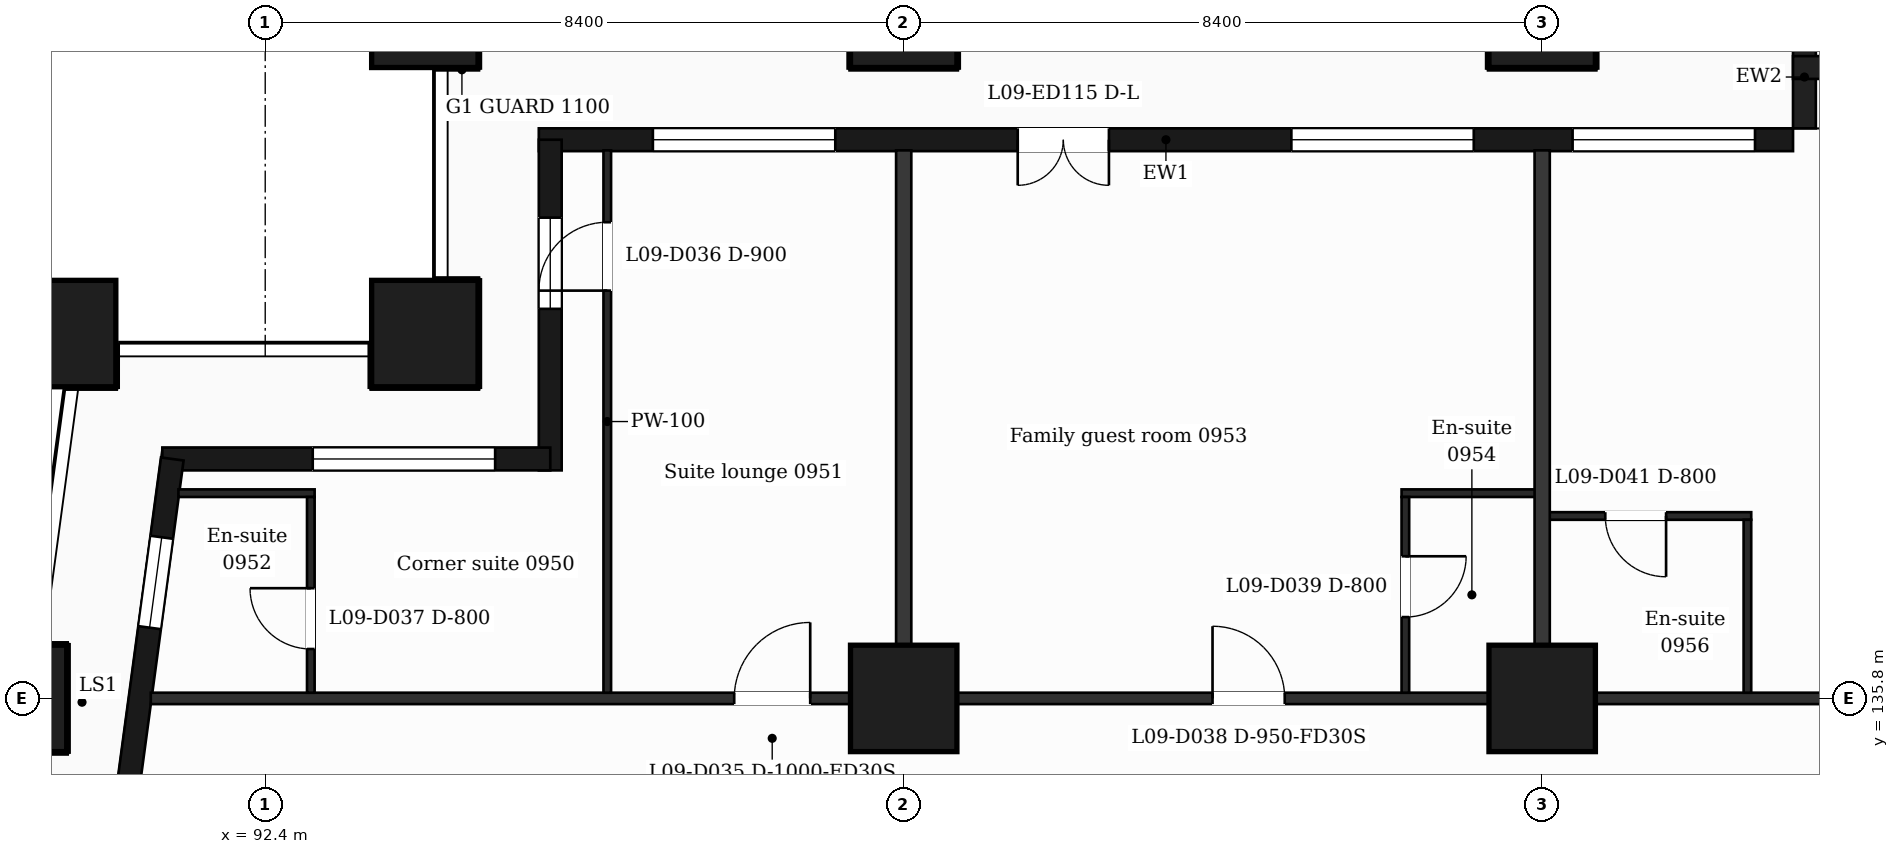
"""IFC4 building model, lengths in metres.
Left out: names, types, materials, properties, quantities, classifications, styles, units other than length and angle.
Written with IfcOpenShell. Run it as: python <this file> out.ifc"""

import sys

from ifc_helpers import new_model, si_unit, direction, frame, frame_2d, origin, origin_2d, place, context, subcontext, project, spatial, rectangle, extrude, element, fill, save


model = new_model("IFC4")
c1 = context("Model", 3, precision=1e-05, world=origin(), true_north=direction((0.0, 1.0)))
c2 = subcontext(c1, "Body", "Model", "MODEL_VIEW")
j1 = project(units=[si_unit("LENGTHUNIT", "METRE"), si_unit("PLANEANGLEUNIT", "RADIAN")], contexts=[c1])
p1 = place(None, origin())
s1 = spatial("IfcSite", under=j1, at=p1, CompositionType="ELEMENT")
p2 = place(p1, origin())
s2 = spatial("IfcBuilding", under=s1, at=p2, CompositionType="ELEMENT")
p3 = place(p2, frame((0.0, 0.0, 49.5)))
s3 = spatial("IfcBuildingStorey", under=s2, at=p3, CompositionType="ELEMENT", Elevation=49.5)
for number, where, z_axis, x_axis in (
    (1, (94.5, 140.6, 0.0), (0.0, 0.0, 1.0), (1.0, 0.0, 0.0)),
    (2, (89.735, 140.6, 0.0), (0.0, 0.0, 1.0), (1.0, 0.0, 0.0)),
    (3, (100.8, 135.8, 0.0), (0.0, 0.0, 1.0), (1.0, 0.0, 0.0)),
    (4, (109.2, 135.8, 0.0), (0.0, 0.0, 1.0), (1.0, 0.0, 0.0)),
    (5, (89.088, 135.8, 0.0), (0.0, 0.0, 1.0), (1.0, 0.0, 0.0)),
    (6, (100.8, 144.8, 0.0), (0.0, 0.0, 1.0), (1.0, 0.0, 0.0)),
    (7, (109.2, 144.8, 0.0), (0.0, 0.0, 1.0), (1.0, 0.0, 0.0)),
    (8, (94.5, 144.8, 0.0), (0.0, 0.0, 1.0), (1.0, 0.0, 0.0)),
):
    element("IfcColumn", number, at=place(p3, frame(where, z_axis=z_axis, x_axis=x_axis)), inside=s3, PredefinedType="COLUMN", context=c2, shape_type="SweptSolid", body=[
        extrude(rectangle(XDim=1.4, YDim=1.4, at=origin_2d()), origin(), (0.0, 0.0, 1.0), 3.5),
    ])
p4 = place(p3, frame((112.5, 143.15, 0.0), z_axis=(0.0, 0.0, 1.0), x_axis=(-1.0, 0.0, 0.0)))
e9 = element("IfcWall", 9, at=p4, inside=s3, PredefinedType="SOLIDWALL", context=c2, shape_type="SweptSolid", body=[
    extrude(rectangle(XDim=16.5, YDim=0.3, at=frame_2d((8.25, 0.0))), origin(), (0.0, 0.0, 1.0), 3.18),
])
p5 = place(p4, frame((0.5, 0.0, 0.9)))
e10 = element("IfcOpeningElement", 10, at=p5, cuts=e9, PredefinedType="OPENING", context=c2, shape_type="SweptSolid", body=[
    extrude(rectangle(XDim=2.4, YDim=2.1, at=frame_2d((1.2, 1.05))), frame((0.0, 0.16, 0.0), z_axis=(0.0, -1.0, 0.0), x_axis=(1.0, 0.0, 0.0)), (0.0, 0.0, 1.0), 0.32),
])
p6 = place(p4, frame((4.2, 0.0, 0.9)))
e11 = element("IfcOpeningElement", 11, at=p6, cuts=e9, PredefinedType="OPENING", context=c2, shape_type="SweptSolid", body=[
    extrude(rectangle(XDim=2.4, YDim=2.1, at=frame_2d((1.2, 1.05))), frame((0.0, 0.16, 0.0), z_axis=(0.0, -1.0, 0.0), x_axis=(1.0, 0.0, 0.0)), (0.0, 0.0, 1.0), 0.32),
])
p7 = place(p4, frame((9.0, 0.0, 0.0)))
e12 = element("IfcOpeningElement", 12, at=p7, cuts=e9, PredefinedType="OPENING", context=c2, shape_type="SweptSolid", body=[
    extrude(rectangle(XDim=1.2, YDim=2.4, at=frame_2d((0.6, 1.2))), frame((0.0, 0.16, 0.0), z_axis=(0.0, -1.0, 0.0), x_axis=(1.0, 0.0, 0.0)), (0.0, 0.0, 1.0), 0.32),
])
p8 = place(p4, frame((12.6, 0.0, 0.9)))
e13 = element("IfcOpeningElement", 13, at=p8, cuts=e9, PredefinedType="OPENING", context=c2, shape_type="SweptSolid", body=[
    extrude(rectangle(XDim=2.4, YDim=2.1, at=frame_2d((1.2, 1.05))), frame((0.0, 0.16, 0.0), z_axis=(0.0, -1.0, 0.0), x_axis=(1.0, 0.0, 0.0)), (0.0, 0.0, 1.0), 0.32),
])
p9 = place(p3, frame((112.65, 143.3, 0.0), z_axis=(0.0, 0.0, 1.0), x_axis=(0.0, 1.0, 0.0)))
e14 = element("IfcWall", 14, at=p9, inside=s3, PredefinedType="SOLIDWALL", context=c2, shape_type="SweptSolid", body=[
    extrude(rectangle(XDim=1.35, YDim=0.3, at=frame_2d((0.675, 0.0))), origin(), (0.0, 0.0, 1.0), 3.18),
])
p10 = place(p3, frame((116.4, 144.1, 0.0), z_axis=(0.0, 0.0, 1.0), x_axis=(-1.0, 0.0, 0.0)))
e15 = element("IfcWall", 15, at=p10, inside=s3, PredefinedType="SOLIDWALL", context=c2, shape_type="SweptSolid", body=[
    extrude(rectangle(XDim=3.9, YDim=0.3, at=frame_2d((1.95, 0.0))), origin(), (0.0, 0.0, 1.0), 3.18),
])
p11 = place(p10, frame((1.35, 0.0, 0.0)))
e16 = element("IfcOpeningElement", 16, at=p11, cuts=e15, PredefinedType="OPENING", context=c2, shape_type="SweptSolid", body=[
    extrude(rectangle(XDim=1.2, YDim=2.4, at=frame_2d((0.6, 1.2))), frame((0.0, 0.16, 0.0), z_axis=(0.0, -1.0, 0.0), x_axis=(1.0, 0.0, 0.0)), (0.0, 0.0, 1.0), 0.32),
])
p12 = place(p3, frame((96.15, 143.15, 0.0), z_axis=(0.0, 0.0, 1.0), x_axis=(0.0, -1.0, 0.0)))
e17 = element("IfcWall", 17, at=p12, inside=s3, PredefinedType="SOLIDWALL", context=c2, shape_type="SweptSolid", body=[
    extrude(rectangle(XDim=4.35, YDim=0.3, at=frame_2d((2.175, 0.0))), origin(), (0.0, 0.0, 1.0), 3.18),
])
p13 = place(p12, frame((1.025, 0.0, 0.9)))
e18 = element("IfcOpeningElement", 18, at=p13, cuts=e17, PredefinedType="OPENING", context=c2, shape_type="SweptSolid", body=[
    extrude(rectangle(XDim=1.2, YDim=2.1, at=frame_2d((0.6, 1.05))), frame((0.0, 0.16, 0.0), z_axis=(0.0, -1.0, 0.0), x_axis=(1.0, 0.0, 0.0)), (0.0, 0.0, 1.0), 0.32),
])
p14 = place(p3, frame((96.15, 138.95, 0.0), z_axis=(0.0, 0.0, 1.0), x_axis=(-1.0, 0.0, 0.0)))
e19 = element("IfcWall", 19, at=p14, inside=s3, PredefinedType="SOLIDWALL", context=c2, shape_type="SweptSolid", body=[
    extrude(rectangle(XDim=5.104, YDim=0.3, at=frame_2d((2.552, 0.0))), origin(), (0.0, 0.0, 1.0), 3.18),
])
p15 = place(p14, frame((0.725, 0.0, 0.9)))
e20 = element("IfcOpeningElement", 20, at=p15, cuts=e19, PredefinedType="OPENING", context=c2, shape_type="SweptSolid", body=[
    extrude(rectangle(XDim=2.4, YDim=2.1, at=frame_2d((1.2, 1.05))), frame((0.0, 0.16, 0.0), z_axis=(0.0, -1.0, 0.0), x_axis=(1.0, 0.0, 0.0)), (0.0, 0.0, 1.0), 0.32),
])
p16 = place(p3, frame((91.177, 138.95, 0.0), z_axis=(0.0, 0.0, 1.0), x_axis=(-0.133426664613, -0.991058689065, 0.0)))
e21 = element("IfcWall", 21, at=p16, inside=s3, PredefinedType="SOLIDWALL", context=c2, shape_type="SweptSolid", body=[
    extrude(rectangle(XDim=6.609, YDim=0.3, at=frame_2d((3.305, 0.0))), origin(), (0.0, 0.0, 1.0), 3.18),
])
p17 = place(p16, frame((1.039, 0.0, 0.9)))
e22 = element("IfcOpeningElement", 22, at=p17, cuts=e21, PredefinedType="OPENING", context=c2, shape_type="SweptSolid", body=[
    extrude(rectangle(XDim=1.2, YDim=2.1, at=frame_2d((0.6, 1.05))), frame((0.0, 0.16, 0.0), z_axis=(0.0, -1.0, 0.0), x_axis=(1.0, 0.0, 0.0)), (0.0, 0.0, 1.0), 0.32),
])
p18 = place(p16, frame((4.294, 0.0, 0.0)))
e23 = element("IfcOpeningElement", 23, at=p18, cuts=e21, PredefinedType="OPENING", context=c2, shape_type="SweptSolid", body=[
    extrude(rectangle(XDim=1.2, YDim=2.4, at=frame_2d((0.6, 1.2))), frame((0.0, 0.16, 0.0), z_axis=(0.0, -1.0, 0.0), x_axis=(1.0, 0.0, 0.0)), (0.0, 0.0, 1.0), 0.32),
])
p19 = place(p3, frame((90.895, 135.8, 0.0), z_axis=(0.0, 0.0, 1.0), x_axis=(1.0, 0.0, 0.0)))
e24 = element("IfcWall", 24, at=p19, inside=s3, PredefinedType="PARTITIONING", context=c2, shape_type="SweptSolid", body=[
    extrude(rectangle(XDim=45.011, YDim=0.15, at=frame_2d((22.505, 0.0))), origin(), (0.0, 0.0, 1.0), 3.18),
])
p20 = place(p19, frame((7.675, 0.0, 0.0)))
e25 = element("IfcOpeningElement", 25, at=p20, cuts=e24, PredefinedType="OPENING", context=c2, shape_type="SweptSolid", body=[
    extrude(rectangle(XDim=1.0, YDim=2.1, at=frame_2d((0.5, 1.05))), frame((0.0, 0.085, 0.0), z_axis=(0.0, -1.0, 0.0), x_axis=(1.0, 0.0, 0.0)), (0.0, 0.0, 1.0), 0.17),
])
p21 = place(p19, frame((13.969, 0.0, 0.0)))
e26 = element("IfcOpeningElement", 26, at=p21, cuts=e24, PredefinedType="OPENING", context=c2, shape_type="SweptSolid", body=[
    extrude(rectangle(XDim=0.95, YDim=2.1, at=frame_2d((0.475, 1.05))), frame((0.0, 0.085, 0.0), z_axis=(0.0, -1.0, 0.0), x_axis=(1.0, 0.0, 0.0)), (0.0, 0.0, 1.0), 0.17),
])
p22 = place(p19, frame((24.393, 0.0, 0.0)))
e27 = element("IfcOpeningElement", 27, at=p22, cuts=e24, PredefinedType="OPENING", context=c2, shape_type="SweptSolid", body=[
    extrude(rectangle(XDim=0.95, YDim=2.1, at=frame_2d((0.475, 1.05))), frame((0.0, 0.085, 0.0), z_axis=(0.0, -1.0, 0.0), x_axis=(1.0, 0.0, 0.0)), (0.0, 0.0, 1.0), 0.17),
])
p23 = place(p19, frame((27.692, 0.0, 0.0)))
e28 = element("IfcOpeningElement", 28, at=p23, cuts=e24, PredefinedType="OPENING", context=c2, shape_type="SweptSolid", body=[
    extrude(rectangle(XDim=0.95, YDim=2.1, at=frame_2d((0.475, 1.05))), frame((0.0, 0.085, 0.0), z_axis=(0.0, -1.0, 0.0), x_axis=(1.0, 0.0, 0.0)), (0.0, 0.0, 1.0), 0.17),
])
p24 = place(p19, frame((32.531, 0.0, 0.0)))
e29 = element("IfcOpeningElement", 29, at=p24, cuts=e24, PredefinedType="OPENING", context=c2, shape_type="SweptSolid", body=[
    extrude(rectangle(XDim=0.95, YDim=2.1, at=frame_2d((0.475, 1.05))), frame((0.0, 0.085, 0.0), z_axis=(0.0, -1.0, 0.0), x_axis=(1.0, 0.0, 0.0)), (0.0, 0.0, 1.0), 0.17),
])
p25 = place(p19, frame((36.335, 0.0, 0.0)))
e30 = element("IfcOpeningElement", 30, at=p25, cuts=e24, PredefinedType="OPENING", context=c2, shape_type="SweptSolid", body=[
    extrude(rectangle(XDim=1.0, YDim=2.1, at=frame_2d((0.5, 1.05))), frame((0.0, 0.085, 0.0), z_axis=(0.0, -1.0, 0.0), x_axis=(1.0, 0.0, 0.0)), (0.0, 0.0, 1.0), 0.17),
])
p26 = place(p3, frame((109.2, 138.2, 0.0), z_axis=(0.0, 0.0, 1.0), x_axis=(1.0, 0.0, 0.0)))
e31 = element("IfcWall", 31, at=p26, inside=s3, PredefinedType="PARTITIONING", context=c2, shape_type="SweptSolid", body=[
    extrude(rectangle(XDim=2.75, YDim=0.1, at=frame_2d((1.375, 0.0))), origin(), (0.0, 0.0, 1.0), 3.18),
])
p27 = place(p26, frame((0.83, 0.0, 0.0)))
e32 = element("IfcOpeningElement", 32, at=p27, cuts=e31, PredefinedType="OPENING", context=c2, shape_type="SweptSolid", body=[
    extrude(rectangle(XDim=0.8, YDim=2.1, at=frame_2d((0.4, 1.05))), frame((0.0, 0.06, 0.0), z_axis=(0.0, -1.0, 0.0), x_axis=(1.0, 0.0, 0.0)), (0.0, 0.0, 1.0), 0.12),
])
p28 = place(p3, frame((91.258, 138.5, 0.0), z_axis=(0.0, 0.0, 1.0), x_axis=(1.0, 0.0, 0.0)))
e33 = element("IfcWall", 33, at=p28, inside=s3, PredefinedType="PARTITIONING", context=c2, shape_type="SweptSolid", body=[
    extrude(rectangle(XDim=1.792, YDim=0.1, at=frame_2d((0.896, 0.0))), origin(), (0.0, 0.0, 1.0), 3.18),
])
p29 = place(p3, frame((107.35, 138.5, 0.0), z_axis=(0.0, 0.0, 1.0), x_axis=(1.0, 0.0, 0.0)))
e34 = element("IfcWall", 34, at=p29, inside=s3, PredefinedType="PARTITIONING", context=c2, shape_type="SweptSolid", body=[
    extrude(rectangle(XDim=1.85, YDim=0.1, at=frame_2d((0.925, 0.0))), origin(), (0.0, 0.0, 1.0), 3.18),
])
p30 = place(p3, frame((93.0, 135.875, 0.0), z_axis=(0.0, 0.0, 1.0), x_axis=(0.0, 1.0, 0.0)))
e35 = element("IfcWall", 35, at=p30, inside=s3, PredefinedType="PARTITIONING", context=c2, shape_type="SweptSolid", body=[
    extrude(rectangle(XDim=2.575, YDim=0.1, at=frame_2d((1.288, 0.0))), origin(), (0.0, 0.0, 1.0), 3.18),
])
p31 = place(p30, frame((0.575, 0.0, 0.0)))
e36 = element("IfcOpeningElement", 36, at=p31, cuts=e35, PredefinedType="OPENING", context=c2, shape_type="SweptSolid", body=[
    extrude(rectangle(XDim=0.8, YDim=2.1, at=frame_2d((0.4, 1.05))), frame((0.0, 0.06, 0.0), z_axis=(0.0, -1.0, 0.0), x_axis=(1.0, 0.0, 0.0)), (0.0, 0.0, 1.0), 0.12),
])
p32 = place(p3, frame((96.9, 135.875, 0.0), z_axis=(0.0, 0.0, 1.0), x_axis=(0.0, 1.0, 0.0)))
e37 = element("IfcWall", 37, at=p32, inside=s3, PredefinedType="PARTITIONING", context=c2, shape_type="SweptSolid", body=[
    extrude(rectangle(XDim=7.135, YDim=0.1, at=frame_2d((3.567, 0.0))), origin(), (0.0, 0.0, 1.0), 3.18),
])
p33 = place(p32, frame((5.29, 0.0, 0.0)))
e38 = element("IfcOpeningElement", 38, at=p33, cuts=e37, PredefinedType="OPENING", context=c2, shape_type="SweptSolid", body=[
    extrude(rectangle(XDim=0.9, YDim=2.1, at=frame_2d((0.45, 1.05))), frame((0.0, 0.06, 0.0), z_axis=(0.0, -1.0, 0.0), x_axis=(1.0, 0.0, 0.0)), (0.0, 0.0, 1.0), 0.12),
])
p34 = place(p3, frame((100.8, 135.875, 0.0), z_axis=(0.0, 0.0, 1.0), x_axis=(0.0, 1.0, 0.0)))
e39 = element("IfcWall", 39, at=p34, inside=s3, PredefinedType="PARTITIONING", context=c2, shape_type="SweptSolid", body=[
    extrude(rectangle(XDim=7.135, YDim=0.2, at=frame_2d((3.567, 0.0))), origin(), (0.0, 0.0, 1.0), 3.18),
])
p35 = place(p3, frame((107.4, 135.875, 0.0), z_axis=(0.0, 0.0, 1.0), x_axis=(0.0, 1.0, 0.0)))
e40 = element("IfcWall", 40, at=p35, inside=s3, PredefinedType="PARTITIONING", context=c2, shape_type="SweptSolid", body=[
    extrude(rectangle(XDim=2.575, YDim=0.1, at=frame_2d((1.288, 0.0))), origin(), (0.0, 0.0, 1.0), 3.18),
])
p36 = place(p35, frame((0.995, 0.0, 0.0)))
e41 = element("IfcOpeningElement", 41, at=p36, cuts=e40, PredefinedType="OPENING", context=c2, shape_type="SweptSolid", body=[
    extrude(rectangle(XDim=0.8, YDim=2.1, at=frame_2d((0.4, 1.05))), frame((0.0, 0.06, 0.0), z_axis=(0.0, -1.0, 0.0), x_axis=(1.0, 0.0, 0.0)), (0.0, 0.0, 1.0), 0.12),
])
p37 = place(p3, frame((109.2, 135.875, 0.0), z_axis=(0.0, 0.0, 1.0), x_axis=(0.0, 1.0, 0.0)))
e42 = element("IfcWall", 42, at=p37, inside=s3, PredefinedType="PARTITIONING", context=c2, shape_type="SweptSolid", body=[
    extrude(rectangle(XDim=7.135, YDim=0.2, at=frame_2d((3.567, 0.0))), origin(), (0.0, 0.0, 1.0), 3.18),
])
p38 = place(p3, frame((111.9, 135.875, 0.0), z_axis=(0.0, 0.0, 1.0), x_axis=(0.0, 1.0, 0.0)))
e43 = element("IfcWall", 43, at=p38, inside=s3, PredefinedType="PARTITIONING", context=c2, shape_type="SweptSolid", body=[
    extrude(rectangle(XDim=2.275, YDim=0.1, at=frame_2d((1.137, 0.0))), origin(), (0.0, 0.0, 1.0), 3.18),
])
p39 = place(p5, origin())
e44 = element("IfcWindow", 44, at=p39, inside=s3, PartitioningType="SINGLE_PANEL", PredefinedType="WINDOW", context=c2, shape_type="SweptSolid", body=[
    extrude(rectangle(XDim=2.4, YDim=2.1, at=frame_2d((1.2, 1.05))), frame((0.0, 0.03, 0.0), z_axis=(0.0, -1.0, 0.0), x_axis=(1.0, 0.0, 0.0)), (0.0, 0.0, 1.0), 0.06),
])
fill(e10, e44)
p40 = place(p6, origin())
e45 = element("IfcWindow", 45, at=p40, inside=s3, PartitioningType="SINGLE_PANEL", PredefinedType="WINDOW", context=c2, shape_type="SweptSolid", body=[
    extrude(rectangle(XDim=2.4, YDim=2.1, at=frame_2d((1.2, 1.05))), frame((0.0, 0.03, 0.0), z_axis=(0.0, -1.0, 0.0), x_axis=(1.0, 0.0, 0.0)), (0.0, 0.0, 1.0), 0.06),
])
fill(e11, e45)
p41 = place(p7, origin())
e46 = element("IfcDoor", 46, at=p41, inside=s3, OperationType="DOUBLE_DOOR_SINGLE_SWING", PredefinedType="DOOR", context=c2, shape_type="SweptSolid", body=[
    extrude(rectangle(XDim=1.2, YDim=2.4, at=frame_2d((0.6, 1.2))), frame((0.0, 0.025, 0.0), z_axis=(0.0, -1.0, 0.0), x_axis=(1.0, 0.0, 0.0)), (0.0, 0.0, 1.0), 0.05),
])
fill(e12, e46)
p42 = place(p8, origin())
e47 = element("IfcWindow", 47, at=p42, inside=s3, PartitioningType="SINGLE_PANEL", PredefinedType="WINDOW", context=c2, shape_type="SweptSolid", body=[
    extrude(rectangle(XDim=2.4, YDim=2.1, at=frame_2d((1.2, 1.05))), frame((0.0, 0.03, 0.0), z_axis=(0.0, -1.0, 0.0), x_axis=(1.0, 0.0, 0.0)), (0.0, 0.0, 1.0), 0.06),
])
fill(e13, e47)
p43 = place(p13, origin())
e48 = element("IfcWindow", 48, at=p43, inside=s3, PartitioningType="SINGLE_PANEL", PredefinedType="WINDOW", context=c2, shape_type="SweptSolid", body=[
    extrude(rectangle(XDim=1.2, YDim=2.1, at=frame_2d((0.6, 1.05))), frame((0.0, 0.03, 0.0), z_axis=(0.0, -1.0, 0.0), x_axis=(1.0, 0.0, 0.0)), (0.0, 0.0, 1.0), 0.06),
])
fill(e18, e48)
p44 = place(p15, origin())
e49 = element("IfcWindow", 49, at=p44, inside=s3, PartitioningType="SINGLE_PANEL", PredefinedType="WINDOW", context=c2, shape_type="SweptSolid", body=[
    extrude(rectangle(XDim=2.4, YDim=2.1, at=frame_2d((1.2, 1.05))), frame((0.0, 0.03, 0.0), z_axis=(0.0, -1.0, 0.0), x_axis=(1.0, 0.0, 0.0)), (0.0, 0.0, 1.0), 0.06),
])
fill(e20, e49)
p45 = place(p17, origin())
e50 = element("IfcWindow", 50, at=p45, inside=s3, PartitioningType="SINGLE_PANEL", PredefinedType="WINDOW", context=c2, shape_type="SweptSolid", body=[
    extrude(rectangle(XDim=1.2, YDim=2.1, at=frame_2d((0.6, 1.05))), frame((0.0, 0.03, 0.0), z_axis=(0.0, -1.0, 0.0), x_axis=(1.0, 0.0, 0.0)), (0.0, 0.0, 1.0), 0.06),
])
fill(e22, e50)
p46 = place(p20, origin())
e51 = element("IfcDoor", 51, at=p46, inside=s3, OperationType="SINGLE_SWING_RIGHT", PredefinedType="DOOR", context=c2, shape_type="SweptSolid", body=[
    extrude(rectangle(XDim=1.0, YDim=2.1, at=frame_2d((0.5, 1.05))), frame((0.0, 0.025, 0.0), z_axis=(0.0, -1.0, 0.0), x_axis=(1.0, 0.0, 0.0)), (0.0, 0.0, 1.0), 0.05),
])
fill(e25, e51)
p47 = place(p33, origin())
e52 = element("IfcDoor", 52, at=p47, inside=s3, OperationType="SINGLE_SWING_LEFT", PredefinedType="DOOR", context=c2, shape_type="SweptSolid", body=[
    extrude(rectangle(XDim=0.9, YDim=2.1, at=frame_2d((0.45, 1.05))), frame((0.0, 0.025, 0.0), z_axis=(0.0, -1.0, 0.0), x_axis=(1.0, 0.0, 0.0)), (0.0, 0.0, 1.0), 0.05),
])
fill(e38, e52)
p48 = place(p31, origin())
e53 = element("IfcDoor", 53, at=p48, inside=s3, OperationType="SINGLE_SWING_RIGHT", PredefinedType="DOOR", context=c2, shape_type="SweptSolid", body=[
    extrude(rectangle(XDim=0.8, YDim=2.1, at=frame_2d((0.4, 1.05))), frame((0.0, 0.025, 0.0), z_axis=(0.0, -1.0, 0.0), x_axis=(1.0, 0.0, 0.0)), (0.0, 0.0, 1.0), 0.05),
])
fill(e36, e53)
p49 = place(p21, origin())
e54 = element("IfcDoor", 54, at=p49, inside=s3, OperationType="SINGLE_SWING_LEFT", PredefinedType="DOOR", context=c2, shape_type="SweptSolid", body=[
    extrude(rectangle(XDim=0.95, YDim=2.1, at=frame_2d((0.475, 1.05))), frame((0.0, 0.025, 0.0), z_axis=(0.0, -1.0, 0.0), x_axis=(1.0, 0.0, 0.0)), (0.0, 0.0, 1.0), 0.05),
])
fill(e26, e54)
p50 = place(p36, origin())
e55 = element("IfcDoor", 55, at=p50, inside=s3, OperationType="SINGLE_SWING_RIGHT", PredefinedType="DOOR", context=c2, shape_type="SweptSolid", body=[
    extrude(rectangle(XDim=0.8, YDim=2.1, at=frame_2d((0.4, 1.05))), frame((0.0, 0.025, 0.0), z_axis=(0.0, -1.0, 0.0), x_axis=(1.0, 0.0, 0.0)), (0.0, 0.0, 1.0), 0.05),
])
fill(e41, e55)
p51 = place(p27, origin())
e56 = element("IfcDoor", 56, at=p51, inside=s3, OperationType="SINGLE_SWING_RIGHT", PredefinedType="DOOR", context=c2, shape_type="SweptSolid", body=[
    extrude(rectangle(XDim=0.8, YDim=2.1, at=frame_2d((0.4, 1.05))), frame((0.0, 0.025, 0.0), z_axis=(0.0, -1.0, 0.0), x_axis=(1.0, 0.0, 0.0)), (0.0, 0.0, 1.0), 0.05),
])
fill(e32, e56)
save(model, sys.argv[1])
